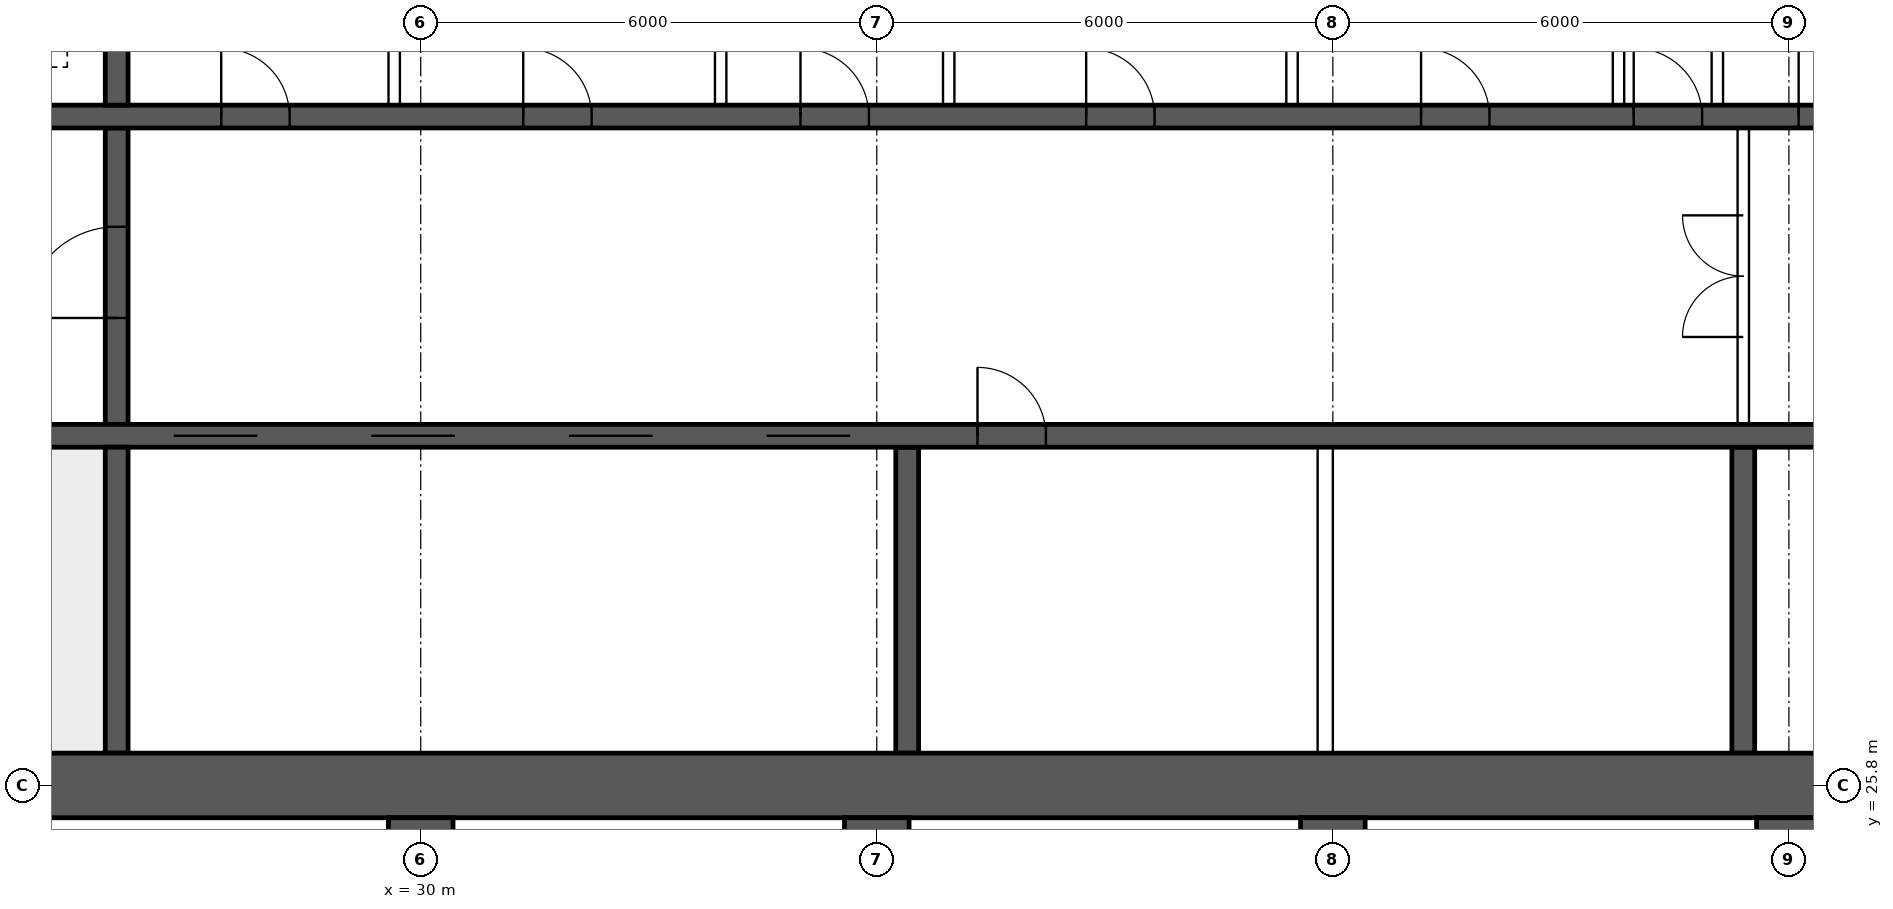
"""IFC4 building model, lengths in metres.
Left out: names, types, materials, properties, quantities, classifications, styles, units other than length and angle.
Written with IfcOpenShell. Run it as: python <this file> out.ifc"""

import sys

from ifc_helpers import new_model, si_unit, direction, frame, frame_2d, origin, place, context, subcontext, project, spatial, rectangle, extrude, element, fill, save


model = new_model("IFC4")
c1 = context("Model", 3, precision=1e-05, world=origin(), true_north=direction((0.0, 1.0)))
c2 = subcontext(c1, "Body", "Model", "MODEL_VIEW")
j1 = project(units=[si_unit("LENGTHUNIT", "METRE"), si_unit("PLANEANGLEUNIT", "RADIAN")], contexts=[c1])
p1 = place(None, origin())
s1 = spatial("IfcSite", under=j1, at=p1, CompositionType="ELEMENT")
p2 = place(p1, origin())
s2 = spatial("IfcBuilding", under=s1, at=p2, CompositionType="ELEMENT")
p3 = place(p2, frame((0.0, 0.0, 152.35)))
s3 = spatial("IfcBuildingStorey", under=s2, at=p3, CompositionType="ELEMENT", Elevation=152.35)
p4 = place(p3, frame((18.0, 25.8, 0.0), z_axis=(0.0, 0.0, 1.0), x_axis=(1.0, 0.0, 0.0)))
e1 = element("IfcWall", 1, at=p4, inside=s3, PredefinedType="SHEAR", context=c2, shape_type="SweptSolid", body=[
    extrude(rectangle(XDim=48.0, YDim=0.85, at=frame_2d((24.0, 0.0))), origin(), (0.0, 0.0, 1.0), 3.75),
])
p5 = place(p3, frame((18.425, 30.4, 0.0), z_axis=(0.0, 0.0, 1.0), x_axis=(1.0, 0.0, 0.0)))
e2 = element("IfcWall", 2, at=p5, inside=s3, PredefinedType="SHEAR", context=c2, shape_type="SweptSolid", body=[
    extrude(rectangle(XDim=47.15, YDim=0.3, at=frame_2d((23.575, 0.0))), origin(), (0.0, 0.0, 1.0), 3.75),
])
p6 = place(p5, frame((0.4, 0.0, 0.0)))
e3 = element("IfcOpeningElement", 3, at=p6, cuts=e2, PredefinedType="OPENING", context=c2, shape_type="SweptSolid", body=[
    extrude(rectangle(XDim=1.0, YDim=2.1, at=frame_2d((0.5, 1.05))), frame((0.0, 0.16, 0.0), z_axis=(0.0, -1.0, 0.0), x_axis=(1.0, 0.0, 0.0)), (0.0, 0.0, 1.0), 0.32),
])
p7 = place(p5, frame((45.75, 0.0, 0.0)))
e4 = element("IfcOpeningElement", 4, at=p7, cuts=e2, PredefinedType="OPENING", context=c2, shape_type="SweptSolid", body=[
    extrude(rectangle(XDim=1.0, YDim=2.1, at=frame_2d((0.5, 1.05))), frame((0.0, 0.16, 0.0), z_axis=(0.0, -1.0, 0.0), x_axis=(1.0, 0.0, 0.0)), (0.0, 0.0, 1.0), 0.32),
])
p8 = place(p5, frame((8.325, 0.0, 0.0)))
e5 = element("IfcOpeningElement", 5, at=p8, cuts=e2, PredefinedType="OPENING", context=c2, shape_type="SweptSolid", body=[
    extrude(rectangle(XDim=1.1, YDim=2.1, at=frame_2d((0.55, 1.05))), frame((0.0, 0.16, 0.0), z_axis=(0.0, -1.0, 0.0), x_axis=(1.0, 0.0, 0.0)), (0.0, 0.0, 1.0), 0.32),
])
p9 = place(p5, frame((10.925, 0.0, 0.0)))
e6 = element("IfcOpeningElement", 6, at=p9, cuts=e2, PredefinedType="OPENING", context=c2, shape_type="SweptSolid", body=[
    extrude(rectangle(XDim=1.1, YDim=2.1, at=frame_2d((0.55, 1.05))), frame((0.0, 0.16, 0.0), z_axis=(0.0, -1.0, 0.0), x_axis=(1.0, 0.0, 0.0)), (0.0, 0.0, 1.0), 0.32),
])
p10 = place(p5, frame((13.525, 0.0, 0.0)))
e7 = element("IfcOpeningElement", 7, at=p10, cuts=e2, PredefinedType="OPENING", context=c2, shape_type="SweptSolid", body=[
    extrude(rectangle(XDim=1.1, YDim=2.1, at=frame_2d((0.55, 1.05))), frame((0.0, 0.16, 0.0), z_axis=(0.0, -1.0, 0.0), x_axis=(1.0, 0.0, 0.0)), (0.0, 0.0, 1.0), 0.32),
])
p11 = place(p5, frame((16.125, 0.0, 0.0)))
e8 = element("IfcOpeningElement", 8, at=p11, cuts=e2, PredefinedType="OPENING", context=c2, shape_type="SweptSolid", body=[
    extrude(rectangle(XDim=1.1, YDim=2.1, at=frame_2d((0.55, 1.05))), frame((0.0, 0.16, 0.0), z_axis=(0.0, -1.0, 0.0), x_axis=(1.0, 0.0, 0.0)), (0.0, 0.0, 1.0), 0.32),
])
p12 = place(p5, frame((18.9, 0.0, 0.0)))
e9 = element("IfcOpeningElement", 9, at=p12, cuts=e2, PredefinedType="OPENING", context=c2, shape_type="SweptSolid", body=[
    extrude(rectangle(XDim=0.9, YDim=2.1, at=frame_2d((0.45, 1.05))), frame((0.0, 0.16, 0.0), z_axis=(0.0, -1.0, 0.0), x_axis=(1.0, 0.0, 0.0)), (0.0, 0.0, 1.0), 0.32),
])
p13 = place(p5, frame((30.192, 0.0, 0.0)))
e10 = element("IfcOpeningElement", 10, at=p13, cuts=e2, PredefinedType="OPENING", context=c2, shape_type="SweptSolid", body=[
    extrude(rectangle(XDim=1.1, YDim=2.1, at=frame_2d((0.55, 1.05))), frame((0.0, 0.16, 0.0), z_axis=(0.0, -1.0, 0.0), x_axis=(1.0, 0.0, 0.0)), (0.0, 0.0, 1.0), 0.32),
])
p14 = place(p5, frame((33.725, 0.0, 0.0)))
e11 = element("IfcOpeningElement", 11, at=p14, cuts=e2, PredefinedType="OPENING", context=c2, shape_type="SweptSolid", body=[
    extrude(rectangle(XDim=1.1, YDim=2.1, at=frame_2d((0.55, 1.05))), frame((0.0, 0.16, 0.0), z_axis=(0.0, -1.0, 0.0), x_axis=(1.0, 0.0, 0.0)), (0.0, 0.0, 1.0), 0.32),
])
p15 = place(p5, frame((37.258, 0.0, 0.0)))
e12 = element("IfcOpeningElement", 12, at=p15, cuts=e2, PredefinedType="OPENING", context=c2, shape_type="SweptSolid", body=[
    extrude(rectangle(XDim=1.1, YDim=2.1, at=frame_2d((0.55, 1.05))), frame((0.0, 0.16, 0.0), z_axis=(0.0, -1.0, 0.0), x_axis=(1.0, 0.0, 0.0)), (0.0, 0.0, 1.0), 0.32),
])
p16 = place(p3, frame((18.425, 34.6, 0.0), z_axis=(0.0, 0.0, 1.0), x_axis=(1.0, 0.0, 0.0)))
e13 = element("IfcWall", 13, at=p16, inside=s3, PredefinedType="SHEAR", context=c2, shape_type="SweptSolid", body=[
    extrude(rectangle(XDim=47.15, YDim=0.3, at=frame_2d((23.575, 0.0))), origin(), (0.0, 0.0, 1.0), 3.75),
])
p17 = place(p16, frame((0.9, 0.0, 0.0)))
e14 = element("IfcOpeningElement", 14, at=p17, cuts=e13, PredefinedType="OPENING", context=c2, shape_type="SweptSolid", body=[
    extrude(rectangle(XDim=1.1, YDim=2.1, at=frame_2d((0.55, 1.05))), frame((0.0, 0.16, 0.0), z_axis=(0.0, -1.0, 0.0), x_axis=(1.0, 0.0, 0.0)), (0.0, 0.0, 1.0), 0.32),
])
p18 = place(p16, frame((45.15, 0.0, 0.0)))
e15 = element("IfcOpeningElement", 15, at=p18, cuts=e13, PredefinedType="OPENING", context=c2, shape_type="SweptSolid", body=[
    extrude(rectangle(XDim=1.1, YDim=2.1, at=frame_2d((0.55, 1.05))), frame((0.0, 0.16, 0.0), z_axis=(0.0, -1.0, 0.0), x_axis=(1.0, 0.0, 0.0)), (0.0, 0.0, 1.0), 0.32),
])
p19 = place(p16, frame((4.175, 0.0, 0.0)))
e16 = element("IfcOpeningElement", 16, at=p19, cuts=e13, PredefinedType="OPENING", context=c2, shape_type="SweptSolid", body=[
    extrude(rectangle(XDim=0.9, YDim=2.1, at=frame_2d((0.45, 1.05))), frame((0.0, 0.16, 0.0), z_axis=(0.0, -1.0, 0.0), x_axis=(1.0, 0.0, 0.0)), (0.0, 0.0, 1.0), 0.32),
])
p20 = place(p16, frame((42.075, 0.0, 0.0)))
e17 = element("IfcOpeningElement", 17, at=p20, cuts=e13, PredefinedType="OPENING", context=c2, shape_type="SweptSolid", body=[
    extrude(rectangle(XDim=0.9, YDim=2.1, at=frame_2d((0.45, 1.05))), frame((0.0, 0.16, 0.0), z_axis=(0.0, -1.0, 0.0), x_axis=(1.0, 0.0, 0.0)), (0.0, 0.0, 1.0), 0.32),
])
p21 = place(p16, frame((8.95, 0.0, 0.0)))
e18 = element("IfcOpeningElement", 18, at=p21, cuts=e13, PredefinedType="OPENING", context=c2, shape_type="SweptSolid", body=[
    extrude(rectangle(XDim=0.9, YDim=2.1, at=frame_2d((0.45, 1.05))), frame((0.0, 0.16, 0.0), z_axis=(0.0, -1.0, 0.0), x_axis=(1.0, 0.0, 0.0)), (0.0, 0.0, 1.0), 0.32),
])
p22 = place(p16, frame((12.924, 0.0, 0.0)))
e19 = element("IfcOpeningElement", 19, at=p22, cuts=e13, PredefinedType="OPENING", context=c2, shape_type="SweptSolid", body=[
    extrude(rectangle(XDim=0.9, YDim=2.1, at=frame_2d((0.45, 1.05))), frame((0.0, 0.16, 0.0), z_axis=(0.0, -1.0, 0.0), x_axis=(1.0, 0.0, 0.0)), (0.0, 0.0, 1.0), 0.32),
])
p23 = place(p16, frame((16.571, 0.0, 0.0)))
e20 = element("IfcOpeningElement", 20, at=p23, cuts=e13, PredefinedType="OPENING", context=c2, shape_type="SweptSolid", body=[
    extrude(rectangle(XDim=0.9, YDim=2.1, at=frame_2d((0.45, 1.05))), frame((0.0, 0.16, 0.0), z_axis=(0.0, -1.0, 0.0), x_axis=(1.0, 0.0, 0.0)), (0.0, 0.0, 1.0), 0.32),
])
p24 = place(p16, frame((20.33, 0.0, 0.0)))
e21 = element("IfcOpeningElement", 21, at=p24, cuts=e13, PredefinedType="OPENING", context=c2, shape_type="SweptSolid", body=[
    extrude(rectangle(XDim=0.9, YDim=2.1, at=frame_2d((0.45, 1.05))), frame((0.0, 0.16, 0.0), z_axis=(0.0, -1.0, 0.0), x_axis=(1.0, 0.0, 0.0)), (0.0, 0.0, 1.0), 0.32),
])
p25 = place(p16, frame((24.736, 0.0, 0.0)))
e22 = element("IfcOpeningElement", 22, at=p25, cuts=e13, PredefinedType="OPENING", context=c2, shape_type="SweptSolid", body=[
    extrude(rectangle(XDim=0.9, YDim=2.1, at=frame_2d((0.45, 1.05))), frame((0.0, 0.16, 0.0), z_axis=(0.0, -1.0, 0.0), x_axis=(1.0, 0.0, 0.0)), (0.0, 0.0, 1.0), 0.32),
])
p26 = place(p16, frame((27.533, 0.0, 0.0)))
e23 = element("IfcOpeningElement", 23, at=p26, cuts=e13, PredefinedType="OPENING", context=c2, shape_type="SweptSolid", body=[
    extrude(rectangle(XDim=0.9, YDim=2.1, at=frame_2d((0.45, 1.05))), frame((0.0, 0.16, 0.0), z_axis=(0.0, -1.0, 0.0), x_axis=(1.0, 0.0, 0.0)), (0.0, 0.0, 1.0), 0.32),
])
p27 = place(p16, frame((29.703, 0.0, 0.0)))
e24 = element("IfcOpeningElement", 24, at=p27, cuts=e13, PredefinedType="OPENING", context=c2, shape_type="SweptSolid", body=[
    extrude(rectangle(XDim=0.9, YDim=2.1, at=frame_2d((0.45, 1.05))), frame((0.0, 0.16, 0.0), z_axis=(0.0, -1.0, 0.0), x_axis=(1.0, 0.0, 0.0)), (0.0, 0.0, 1.0), 0.32),
])
p28 = place(p16, frame((33.502, 0.0, 0.0)))
e25 = element("IfcOpeningElement", 25, at=p28, cuts=e13, PredefinedType="OPENING", context=c2, shape_type="SweptSolid", body=[
    extrude(rectangle(XDim=0.9, YDim=2.1, at=frame_2d((0.45, 1.05))), frame((0.0, 0.16, 0.0), z_axis=(0.0, -1.0, 0.0), x_axis=(1.0, 0.0, 0.0)), (0.0, 0.0, 1.0), 0.32),
])
p29 = place(p16, frame((37.453, 0.0, 0.0)))
e26 = element("IfcOpeningElement", 26, at=p29, cuts=e13, PredefinedType="OPENING", context=c2, shape_type="SweptSolid", body=[
    extrude(rectangle(XDim=0.9, YDim=2.1, at=frame_2d((0.45, 1.05))), frame((0.0, 0.16, 0.0), z_axis=(0.0, -1.0, 0.0), x_axis=(1.0, 0.0, 0.0)), (0.0, 0.0, 1.0), 0.32),
])
p30 = place(p3, frame((26.0, 26.225, 0.0), z_axis=(0.0, 0.0, 1.0), x_axis=(0.0, 1.0, 0.0)))
e27 = element("IfcWall", 27, at=p30, inside=s3, PredefinedType="SHEAR", context=c2, shape_type="SweptSolid", body=[
    extrude(rectangle(XDim=4.025, YDim=0.3, at=frame_2d((2.012, 0.0))), origin(), (0.0, 0.0, 1.0), 3.75),
])
p31 = place(p3, frame((26.0, 30.55, 0.0), z_axis=(0.0, 0.0, 1.0), x_axis=(0.0, 1.0, 0.0)))
e28 = element("IfcWall", 28, at=p31, inside=s3, PredefinedType="SHEAR", context=c2, shape_type="SweptSolid", body=[
    extrude(rectangle(XDim=3.9, YDim=0.3, at=frame_2d((1.95, 0.0))), origin(), (0.0, 0.0, 1.0), 3.75),
])
p32 = place(p31, frame((1.4, 0.0, 0.0)))
e29 = element("IfcOpeningElement", 29, at=p32, cuts=e28, PredefinedType="OPENING", context=c2, shape_type="SweptSolid", body=[
    extrude(rectangle(XDim=1.2, YDim=2.1, at=frame_2d((0.6, 1.05))), frame((0.0, 0.16, 0.0), z_axis=(0.0, -1.0, 0.0), x_axis=(1.0, 0.0, 0.0)), (0.0, 0.0, 1.0), 0.32),
])
p33 = place(p3, frame((26.0, 34.75, 0.0), z_axis=(0.0, 0.0, 1.0), x_axis=(0.0, 1.0, 0.0)))
e30 = element("IfcWall", 30, at=p33, inside=s3, PredefinedType="SHEAR", context=c2, shape_type="SweptSolid", body=[
    extrude(rectangle(XDim=3.025, YDim=0.3, at=frame_2d((1.512, 0.0))), origin(), (0.0, 0.0, 1.0), 3.75),
])
for number, where, z_axis, x_axis in (
    (31, (36.4, 26.225, 0.0), (0.0, 0.0, 1.0), (0.0, 1.0, 0.0)),
    (32, (47.4, 26.225, 0.0), (0.0, 0.0, 1.0), (0.0, 1.0, 0.0)),
):
    element("IfcWall", number, at=place(p3, frame(where, z_axis=z_axis, x_axis=x_axis)), inside=s3, PredefinedType="SHEAR", context=c2, shape_type="SweptSolid", body=[
        extrude(rectangle(XDim=4.025, YDim=0.3, at=frame_2d((2.012, 0.0))), origin(), (0.0, 0.0, 1.0), 3.75),
    ])
for number, where, z_axis, x_axis in (
    (33, (30.0, 17.2, 0.0), (0.0, 0.0, 1.0), (0.0, 1.0, 0.0)),
    (34, (36.0, 17.2, 0.0), (0.0, 0.0, 1.0), (0.0, 1.0, 0.0)),
    (35, (42.0, 17.2, 0.0), (0.0, 0.0, 1.0), (0.0, 1.0, 0.0)),
    (36, (48.0, 17.2, 0.0), (0.0, 0.0, 1.0), (0.0, 1.0, 0.0)),
):
    element("IfcWall", number, at=place(p3, frame(where, z_axis=z_axis, x_axis=x_axis)), inside=s3, PredefinedType="SHEAR", context=c2, shape_type="SweptSolid", body=[
        extrude(rectangle(XDim=8.175, YDim=0.85, at=frame_2d((4.087, 0.0))), origin(), (0.0, 0.0, 1.0), 3.75),
    ])
p34 = place(p3, frame((47.4, 30.55, 0.0), z_axis=(0.0, 0.0, 1.0), x_axis=(0.0, 1.0, 0.0)))
e37 = element("IfcWall", 37, at=p34, inside=s3, PredefinedType="SOLIDWALL", context=c2, shape_type="SweptSolid", body=[
    extrude(rectangle(XDim=3.9, YDim=0.15, at=frame_2d((1.95, 0.0))), origin(), (0.0, 0.0, 1.0), 3.5),
])
p35 = place(p34, frame((1.15, 0.0, 0.0)))
e38 = element("IfcOpeningElement", 38, at=p35, cuts=e37, PredefinedType="OPENING", context=c2, shape_type="SweptSolid", body=[
    extrude(rectangle(XDim=1.6, YDim=2.1, at=frame_2d((0.8, 1.05))), frame((0.0, 0.085, 0.0), z_axis=(0.0, -1.0, 0.0), x_axis=(1.0, 0.0, 0.0)), (0.0, 0.0, 1.0), 0.17),
])
for number, where, z_axis, x_axis in (
    (39, (29.651, 34.75, 0.0), (0.0, 0.0, 1.0), (0.0, 1.0, 0.0)),
    (40, (33.946, 34.75, 0.0), (0.0, 0.0, 1.0), (0.0, 1.0, 0.0)),
    (41, (36.946, 34.75, 0.0), (0.0, 0.0, 1.0), (0.0, 1.0, 0.0)),
    (42, (41.463, 34.75, 0.0), (0.0, 0.0, 1.0), (0.0, 1.0, 0.0)),
    (43, (45.758, 34.75, 0.0), (0.0, 0.0, 1.0), (0.0, 1.0, 0.0)),
    (44, (47.058, 34.75, 0.0), (0.0, 0.0, 1.0), (0.0, 1.0, 0.0)),
):
    element("IfcWall", number, at=place(p3, frame(where, z_axis=z_axis, x_axis=x_axis)), inside=s3, PredefinedType="SOLIDWALL", context=c2, shape_type="SweptSolid", body=[
        extrude(rectangle(XDim=3.025, YDim=0.15, at=frame_2d((1.512, 0.0))), origin(), (0.0, 0.0, 1.0), 3.5),
    ])
p36 = place(p3, frame((41.9, 26.225, 0.0), z_axis=(0.0, 0.0, 1.0), x_axis=(0.0, 1.0, 0.0)))
e45 = element("IfcWall", 45, at=p36, inside=s3, PredefinedType="SOLIDWALL", context=c2, shape_type="SweptSolid", body=[
    extrude(rectangle(XDim=4.025, YDim=0.2, at=frame_2d((2.012, 0.0))), origin(), (0.0, 0.0, 1.0), 3.5),
])
p37 = place(p35, origin())
e46 = element("IfcDoor", 46, at=p37, inside=s3, OperationType="DOUBLE_DOOR_SINGLE_SWING", PredefinedType="DOOR", context=c2, shape_type="SweptSolid", body=[
    extrude(rectangle(XDim=1.6, YDim=2.1, at=frame_2d((0.8, 1.05))), frame((0.0, 0.025, 0.0), z_axis=(0.0, -1.0, 0.0), x_axis=(1.0, 0.0, 0.0)), (0.0, 0.0, 1.0), 0.05),
])
fill(e38, e46)
p38 = place(p32, origin())
e47 = element("IfcDoor", 47, at=p38, inside=s3, OperationType="SINGLE_SWING_LEFT", PredefinedType="DOOR", context=c2, shape_type="SweptSolid", body=[
    extrude(rectangle(XDim=1.2, YDim=2.1, at=frame_2d((0.6, 1.05))), frame((0.0, 0.025, 0.0), z_axis=(0.0, -1.0, 0.0), x_axis=(1.0, 0.0, 0.0)), (0.0, 0.0, 1.0), 0.05),
])
fill(e29, e47)
p39 = place(p21, origin())
e48 = element("IfcDoor", 48, at=p39, inside=s3, OperationType="SINGLE_SWING_LEFT", PredefinedType="DOOR", context=c2, shape_type="SweptSolid", body=[
    extrude(rectangle(XDim=0.9, YDim=2.1, at=frame_2d((0.45, 1.05))), frame((0.0, 0.025, 0.0), z_axis=(0.0, -1.0, 0.0), x_axis=(1.0, 0.0, 0.0)), (0.0, 0.0, 1.0), 0.05),
])
fill(e18, e48)
p40 = place(p22, origin())
e49 = element("IfcDoor", 49, at=p40, inside=s3, OperationType="SINGLE_SWING_LEFT", PredefinedType="DOOR", context=c2, shape_type="SweptSolid", body=[
    extrude(rectangle(XDim=0.9, YDim=2.1, at=frame_2d((0.45, 1.05))), frame((0.0, 0.025, 0.0), z_axis=(0.0, -1.0, 0.0), x_axis=(1.0, 0.0, 0.0)), (0.0, 0.0, 1.0), 0.05),
])
fill(e19, e49)
p41 = place(p23, origin())
e50 = element("IfcDoor", 50, at=p41, inside=s3, OperationType="SINGLE_SWING_LEFT", PredefinedType="DOOR", context=c2, shape_type="SweptSolid", body=[
    extrude(rectangle(XDim=0.9, YDim=2.1, at=frame_2d((0.45, 1.05))), frame((0.0, 0.025, 0.0), z_axis=(0.0, -1.0, 0.0), x_axis=(1.0, 0.0, 0.0)), (0.0, 0.0, 1.0), 0.05),
])
fill(e20, e50)
p42 = place(p24, origin())
e51 = element("IfcDoor", 51, at=p42, inside=s3, OperationType="SINGLE_SWING_LEFT", PredefinedType="DOOR", context=c2, shape_type="SweptSolid", body=[
    extrude(rectangle(XDim=0.9, YDim=2.1, at=frame_2d((0.45, 1.05))), frame((0.0, 0.025, 0.0), z_axis=(0.0, -1.0, 0.0), x_axis=(1.0, 0.0, 0.0)), (0.0, 0.0, 1.0), 0.05),
])
fill(e21, e51)
p43 = place(p25, origin())
e52 = element("IfcDoor", 52, at=p43, inside=s3, OperationType="SINGLE_SWING_LEFT", PredefinedType="DOOR", context=c2, shape_type="SweptSolid", body=[
    extrude(rectangle(XDim=0.9, YDim=2.1, at=frame_2d((0.45, 1.05))), frame((0.0, 0.025, 0.0), z_axis=(0.0, -1.0, 0.0), x_axis=(1.0, 0.0, 0.0)), (0.0, 0.0, 1.0), 0.05),
])
fill(e22, e52)
p44 = place(p26, origin())
e53 = element("IfcDoor", 53, at=p44, inside=s3, OperationType="SINGLE_SWING_LEFT", PredefinedType="DOOR", context=c2, shape_type="SweptSolid", body=[
    extrude(rectangle(XDim=0.9, YDim=2.1, at=frame_2d((0.45, 1.05))), frame((0.0, 0.025, 0.0), z_axis=(0.0, -1.0, 0.0), x_axis=(1.0, 0.0, 0.0)), (0.0, 0.0, 1.0), 0.05),
])
fill(e23, e53)
p45 = place(p27, origin())
e54 = element("IfcDoor", 54, at=p45, inside=s3, OperationType="SINGLE_SWING_LEFT", PredefinedType="DOOR", context=c2, shape_type="SweptSolid", body=[
    extrude(rectangle(XDim=0.9, YDim=2.1, at=frame_2d((0.45, 1.05))), frame((0.0, 0.025, 0.0), z_axis=(0.0, -1.0, 0.0), x_axis=(1.0, 0.0, 0.0)), (0.0, 0.0, 1.0), 0.05),
])
fill(e24, e54)
p46 = place(p8, origin())
e55 = element("IfcDoor", 55, at=p46, inside=s3, OperationType="DOUBLE_DOOR_SLIDING", PredefinedType="DOOR", context=c2, shape_type="SweptSolid", body=[
    extrude(rectangle(XDim=1.1, YDim=2.1, at=frame_2d((0.55, 1.05))), frame((0.0, 0.025, 0.0), z_axis=(0.0, -1.0, 0.0), x_axis=(1.0, 0.0, 0.0)), (0.0, 0.0, 1.0), 0.05),
])
fill(e5, e55)
p47 = place(p9, origin())
e56 = element("IfcDoor", 56, at=p47, inside=s3, OperationType="DOUBLE_DOOR_SLIDING", PredefinedType="DOOR", context=c2, shape_type="SweptSolid", body=[
    extrude(rectangle(XDim=1.1, YDim=2.1, at=frame_2d((0.55, 1.05))), frame((0.0, 0.025, 0.0), z_axis=(0.0, -1.0, 0.0), x_axis=(1.0, 0.0, 0.0)), (0.0, 0.0, 1.0), 0.05),
])
fill(e6, e56)
p48 = place(p10, origin())
e57 = element("IfcDoor", 57, at=p48, inside=s3, OperationType="DOUBLE_DOOR_SLIDING", PredefinedType="DOOR", context=c2, shape_type="SweptSolid", body=[
    extrude(rectangle(XDim=1.1, YDim=2.1, at=frame_2d((0.55, 1.05))), frame((0.0, 0.025, 0.0), z_axis=(0.0, -1.0, 0.0), x_axis=(1.0, 0.0, 0.0)), (0.0, 0.0, 1.0), 0.05),
])
fill(e7, e57)
p49 = place(p11, origin())
e58 = element("IfcDoor", 58, at=p49, inside=s3, OperationType="DOUBLE_DOOR_SLIDING", PredefinedType="DOOR", context=c2, shape_type="SweptSolid", body=[
    extrude(rectangle(XDim=1.1, YDim=2.1, at=frame_2d((0.55, 1.05))), frame((0.0, 0.025, 0.0), z_axis=(0.0, -1.0, 0.0), x_axis=(1.0, 0.0, 0.0)), (0.0, 0.0, 1.0), 0.05),
])
fill(e8, e58)
p50 = place(p12, origin())
e59 = element("IfcDoor", 59, at=p50, inside=s3, OperationType="SINGLE_SWING_LEFT", PredefinedType="DOOR", context=c2, shape_type="SweptSolid", body=[
    extrude(rectangle(XDim=0.9, YDim=2.1, at=frame_2d((0.45, 1.05))), frame((0.0, 0.025, 0.0), z_axis=(0.0, -1.0, 0.0), x_axis=(1.0, 0.0, 0.0)), (0.0, 0.0, 1.0), 0.05),
])
fill(e9, e59)
save(model, sys.argv[1])
